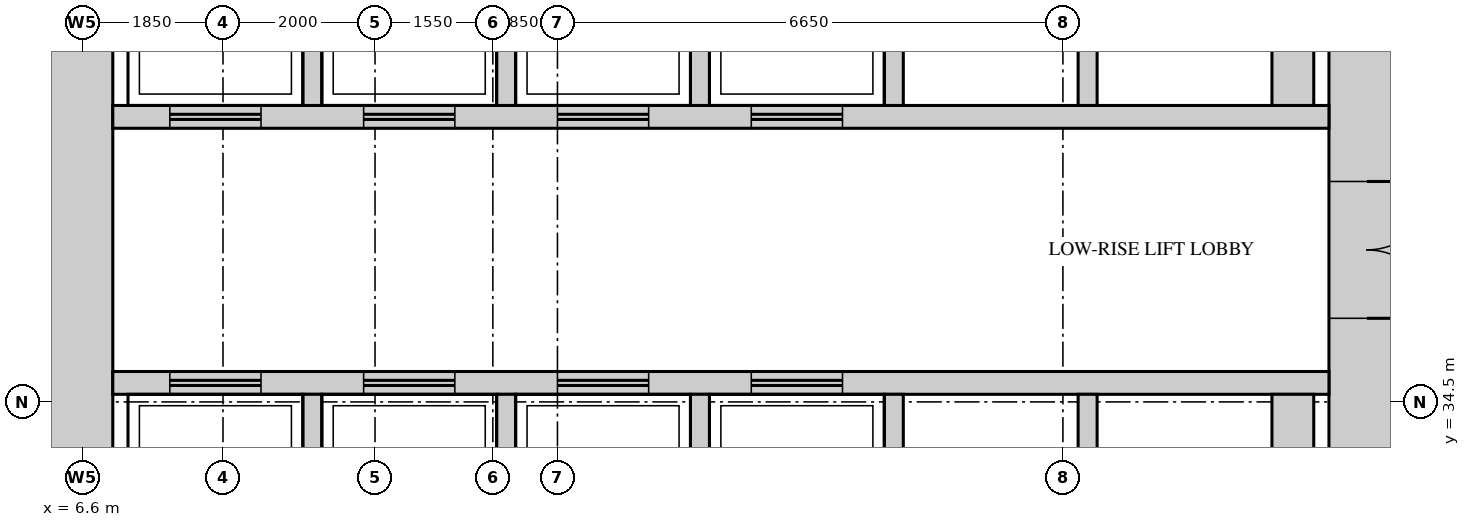
"""IFC4 building model, lengths in metres.
Left out: names, types, materials, properties, quantities, classifications, styles, units other than length and angle.
Written with IfcOpenShell. Run it as: python <this file> out.ifc"""

import sys

from ifc_helpers import new_model, si_unit, direction, frame, frame_2d, origin, place, context, subcontext, project, spatial, rectangle, extrude, source, transform, mapped, element, fill, save


model = new_model("IFC4")
c1 = context("Model", 3, precision=1e-05, world=origin(), true_north=direction((0.0, 1.0)))
c2 = subcontext(c1, "Body", "Model", "MODEL_VIEW")
j1 = project(units=[si_unit("LENGTHUNIT", "METRE"), si_unit("PLANEANGLEUNIT", "RADIAN")], contexts=[c1])
p1 = place(None, origin())
s1 = spatial("IfcSite", under=j1, at=p1, CompositionType="ELEMENT")
p2 = place(p1, origin())
s2 = spatial("IfcBuilding", under=s1, at=p2, CompositionType="ELEMENT")
p3 = place(p2, frame((0.0, 0.0, 127.9)))
s3 = spatial("IfcBuildingStorey", under=s2, at=p3, CompositionType="ELEMENT", Elevation=127.9)
m1 = source(origin(), c2, "Body", "SweptSolid", [
    extrude(rectangle(XDim=28.0, YDim=1.0, at=frame_2d((14.0, 0.0))), origin(), (0.0, 0.0, 1.0), 4.1),
])
p4 = place(p3, frame((23.5, 13.0, 0.0), z_axis=(0.0, 0.0, 1.0), x_axis=(0.0, 1.0, 0.0)))
e1 = element("IfcWall", 1, at=p4, inside=s3, PredefinedType="SHEAR", context=c2, shape_type="MappedRepresentation", body=[
    mapped(m1, transform((0.0, 0.0, 0.0))),
])
m2 = source(origin(), c2, "Body", "SweptSolid", [
    extrude(rectangle(XDim=1.8, YDim=2.1, at=frame_2d((0.9, 1.05))), frame((0.0, 0.51, 0.0), z_axis=(0.0, -1.0, 0.0), x_axis=(1.0, 0.0, 0.0)), (0.0, 0.0, 1.0), 1.02),
])
p5 = place(p4, frame((22.6, 0.0, 0.0)))
e2 = element("IfcOpeningElement", 2, at=p5, cuts=e1, PredefinedType="OPENING", context=c2, shape_type="MappedRepresentation", body=[
    mapped(m2, transform((0.0, 0.0, 0.0))),
])
m3 = source(origin(), c2, "Body", "SweptSolid", [
    extrude(rectangle(XDim=1.2, YDim=2.1, at=frame_2d((0.6, 1.05))), frame((0.0, 0.51, 0.0), z_axis=(0.0, -1.0, 0.0), x_axis=(1.0, 0.0, 0.0)), (0.0, 0.0, 1.0), 1.02),
])
p6 = place(p4, frame((15.35, 0.0, 0.0)))
e3 = element("IfcOpeningElement", 3, at=p6, cuts=e1, PredefinedType="OPENING", context=c2, shape_type="MappedRepresentation", body=[
    mapped(m3, transform((0.0, 0.0, 0.0))),
])
m4 = source(origin(), c2, "Body", "SweptSolid", [
    extrude(rectangle(XDim=0.9, YDim=2.1, at=frame_2d((0.45, 1.05))), frame((0.0, 0.51, 0.0), z_axis=(0.0, -1.0, 0.0), x_axis=(1.0, 0.0, 0.0)), (0.0, 0.0, 1.0), 1.02),
])
p7 = place(p4, frame((1.35, 0.0, 0.0)))
e4 = element("IfcOpeningElement", 4, at=p7, cuts=e1, PredefinedType="OPENING", context=c2, shape_type="MappedRepresentation", body=[
    mapped(m4, transform((0.0, 0.0, 0.0))),
])
p8 = place(p4, frame((4.55, 0.0, 0.0)))
e5 = element("IfcOpeningElement", 5, at=p8, cuts=e1, PredefinedType="OPENING", context=c2, shape_type="MappedRepresentation", body=[
    mapped(m4, transform((0.0, 0.0, 0.0))),
])
p9 = place(p4, frame((7.8, 0.0, 0.0)))
e6 = element("IfcOpeningElement", 6, at=p9, cuts=e1, PredefinedType="OPENING", context=c2, shape_type="MappedRepresentation", body=[
    mapped(m4, transform((0.0, 0.0, 0.0))),
])
p10 = place(p3, frame((6.5, 13.0, 0.0), z_axis=(0.0, 0.0, 1.0), x_axis=(0.0, 1.0, 0.0)))
e7 = element("IfcWall", 7, at=p10, inside=s3, PredefinedType="SHEAR", context=c2, shape_type="MappedRepresentation", body=[
    mapped(m1, transform((0.0, 0.0, 0.0))),
])
m5 = source(origin(), c2, "Body", "SweptSolid", [
    extrude(rectangle(XDim=16.0, YDim=0.3, at=frame_2d((8.0, 0.0))), origin(), (0.0, 0.0, 1.0), 4.1),
])
p11 = place(p3, frame((7.0, 38.25, 0.0), z_axis=(0.0, 0.0, 1.0), x_axis=(1.0, 0.0, 0.0)))
e8 = element("IfcWall", 8, at=p11, inside=s3, PredefinedType="STANDARD", context=c2, shape_type="MappedRepresentation", body=[
    mapped(m5, transform((0.0, 0.0, 0.0))),
])
m6 = source(origin(), c2, "Body", "SweptSolid", [
    extrude(rectangle(XDim=1.2, YDim=2.1, at=frame_2d((0.6, 1.05))), frame((0.0, 0.16, 0.0), z_axis=(0.0, -1.0, 0.0), x_axis=(1.0, 0.0, 0.0)), (0.0, 0.0, 1.0), 0.32),
])
p12 = place(p11, frame((0.75, 0.0, 0.0)))
e9 = element("IfcOpeningElement", 9, at=p12, cuts=e8, PredefinedType="OPENING", context=c2, shape_type="MappedRepresentation", body=[
    mapped(m6, transform((0.0, 0.0, 0.0))),
])
p13 = place(p11, frame((3.3, 0.0, 0.0)))
e10 = element("IfcOpeningElement", 10, at=p13, cuts=e8, PredefinedType="OPENING", context=c2, shape_type="MappedRepresentation", body=[
    mapped(m6, transform((0.0, 0.0, 0.0))),
])
p14 = place(p11, frame((5.85, 0.0, 0.0)))
e11 = element("IfcOpeningElement", 11, at=p14, cuts=e8, PredefinedType="OPENING", context=c2, shape_type="MappedRepresentation", body=[
    mapped(m6, transform((0.0, 0.0, 0.0))),
])
p15 = place(p11, frame((8.4, 0.0, 0.0)))
e12 = element("IfcOpeningElement", 12, at=p15, cuts=e8, PredefinedType="OPENING", context=c2, shape_type="MappedRepresentation", body=[
    mapped(m6, transform((0.0, 0.0, 0.0))),
])
p16 = place(p3, frame((7.0, 34.75, 0.0), z_axis=(0.0, 0.0, 1.0), x_axis=(1.0, 0.0, 0.0)))
e13 = element("IfcWall", 13, at=p16, inside=s3, PredefinedType="STANDARD", context=c2, shape_type="MappedRepresentation", body=[
    mapped(m5, transform((0.0, 0.0, 0.0))),
])
p17 = place(p16, frame((0.75, 0.0, 0.0)))
e14 = element("IfcOpeningElement", 14, at=p17, cuts=e13, PredefinedType="OPENING", context=c2, shape_type="MappedRepresentation", body=[
    mapped(m6, transform((0.0, 0.0, 0.0))),
])
p18 = place(p16, frame((3.3, 0.0, 0.0)))
e15 = element("IfcOpeningElement", 15, at=p18, cuts=e13, PredefinedType="OPENING", context=c2, shape_type="MappedRepresentation", body=[
    mapped(m6, transform((0.0, 0.0, 0.0))),
])
p19 = place(p16, frame((5.85, 0.0, 0.0)))
e16 = element("IfcOpeningElement", 16, at=p19, cuts=e13, PredefinedType="OPENING", context=c2, shape_type="MappedRepresentation", body=[
    mapped(m6, transform((0.0, 0.0, 0.0))),
])
p20 = place(p16, frame((8.4, 0.0, 0.0)))
e17 = element("IfcOpeningElement", 17, at=p20, cuts=e13, PredefinedType="OPENING", context=c2, shape_type="MappedRepresentation", body=[
    mapped(m6, transform((0.0, 0.0, 0.0))),
])
m7 = source(origin(), c2, "Body", "SweptSolid", [
    extrude(rectangle(XDim=2.6, YDim=0.25, at=frame_2d((1.3, 0.0))), origin(), (0.0, 0.0, 1.0), 4.1),
])
for number, where, z_axis, x_axis in (
    (18, (9.625, 38.4, 0.0), (0.0, 0.0, 1.0), (0.0, 1.0, 0.0)),
    (19, (12.175, 38.4, 0.0), (0.0, 0.0, 1.0), (0.0, 1.0, 0.0)),
    (20, (14.725, 38.4, 0.0), (0.0, 0.0, 1.0), (0.0, 1.0, 0.0)),
    (21, (17.275, 38.4, 0.0), (0.0, 0.0, 1.0), (0.0, 1.0, 0.0)),
    (22, (19.825, 38.4, 0.0), (0.0, 0.0, 1.0), (0.0, 1.0, 0.0)),
):
    element("IfcWall", number, at=place(p3, frame(where, z_axis=z_axis, x_axis=x_axis)), inside=s3, PredefinedType="STANDARD", context=c2, shape_type="MappedRepresentation", body=[
        mapped(m7, transform((0.0, 0.0, 0.0))),
    ])
m8 = source(origin(), c2, "Body", "SweptSolid", [
    extrude(rectangle(XDim=2.6, YDim=0.55, at=frame_2d((1.3, 0.0))), origin(), (0.0, 0.0, 1.0), 4.1),
])
p21 = place(p3, frame((22.525, 38.4, 0.0), z_axis=(0.0, 0.0, 1.0), x_axis=(0.0, 1.0, 0.0)))
e23 = element("IfcWall", 23, at=p21, inside=s3, PredefinedType="STANDARD", context=c2, shape_type="MappedRepresentation", body=[
    mapped(m8, transform((0.0, 0.0, 0.0))),
])
m9 = source(origin(), c2, "Body", "SweptSolid", [
    extrude(rectangle(XDim=2.4, YDim=0.25, at=frame_2d((1.2, 0.0))), origin(), (0.0, 0.0, 1.0), 4.1),
])
for number, where, z_axis, x_axis in (
    (24, (9.625, 32.2, 0.0), (0.0, 0.0, 1.0), (0.0, 1.0, 0.0)),
    (25, (12.175, 32.2, 0.0), (0.0, 0.0, 1.0), (0.0, 1.0, 0.0)),
    (26, (14.725, 32.2, 0.0), (0.0, 0.0, 1.0), (0.0, 1.0, 0.0)),
    (27, (17.275, 32.2, 0.0), (0.0, 0.0, 1.0), (0.0, 1.0, 0.0)),
    (28, (19.825, 32.2, 0.0), (0.0, 0.0, 1.0), (0.0, 1.0, 0.0)),
):
    element("IfcWall", number, at=place(p3, frame(where, z_axis=z_axis, x_axis=x_axis)), inside=s3, PredefinedType="STANDARD", context=c2, shape_type="MappedRepresentation", body=[
        mapped(m9, transform((0.0, 0.0, 0.0))),
    ])
m10 = source(origin(), c2, "Body", "SweptSolid", [
    extrude(rectangle(XDim=2.4, YDim=0.55, at=frame_2d((1.2, 0.0))), origin(), (0.0, 0.0, 1.0), 4.1),
])
p22 = place(p3, frame((22.525, 32.2, 0.0), z_axis=(0.0, 0.0, 1.0), x_axis=(0.0, 1.0, 0.0)))
e29 = element("IfcWall", 29, at=p22, inside=s3, PredefinedType="STANDARD", context=c2, shape_type="MappedRepresentation", body=[
    mapped(m10, transform((0.0, 0.0, 0.0))),
])
m11 = source(origin(), c2, "Body", "SweptSolid", [
    extrude(rectangle(XDim=1.8, YDim=2.1, at=frame_2d((0.9, 1.05))), frame((0.0, 0.45, 0.0), z_axis=(0.0, -1.0, 0.0), x_axis=(1.0, 0.0, 0.0)), (0.0, 0.0, 1.0), 0.9),
])
p23 = place(p5, origin())
e30 = element("IfcDoor", 30, at=p23, inside=s3, OperationType="DOUBLE_DOOR_SINGLE_SWING", PredefinedType="DOOR", context=c2, shape_type="MappedRepresentation", body=[
    mapped(m11, transform((0.0, 0.0, 0.0))),
])
fill(e2, e30)
m12 = source(origin(), c2, "Body", "SweptSolid", [
    extrude(rectangle(XDim=1.2, YDim=2.1, at=frame_2d((0.6, 1.05))), frame((0.0, 0.025, 0.0), z_axis=(0.0, -1.0, 0.0), x_axis=(1.0, 0.0, 0.0)), (0.0, 0.0, 1.0), 0.05),
])
p24 = place(p17, origin())
e31 = element("IfcDoor", 31, at=p24, inside=s3, OperationType="DOUBLE_DOOR_SLIDING", PredefinedType="DOOR", context=c2, shape_type="MappedRepresentation", body=[
    mapped(m12, transform((0.0, 0.0, 0.0))),
])
fill(e14, e31)
p25 = place(p18, origin())
e32 = element("IfcDoor", 32, at=p25, inside=s3, OperationType="DOUBLE_DOOR_SLIDING", PredefinedType="DOOR", context=c2, shape_type="MappedRepresentation", body=[
    mapped(m12, transform((0.0, 0.0, 0.0))),
])
fill(e15, e32)
p26 = place(p19, origin())
e33 = element("IfcDoor", 33, at=p26, inside=s3, OperationType="DOUBLE_DOOR_SLIDING", PredefinedType="DOOR", context=c2, shape_type="MappedRepresentation", body=[
    mapped(m12, transform((0.0, 0.0, 0.0))),
])
fill(e16, e33)
p27 = place(p20, origin())
e34 = element("IfcDoor", 34, at=p27, inside=s3, OperationType="DOUBLE_DOOR_SLIDING", PredefinedType="DOOR", context=c2, shape_type="MappedRepresentation", body=[
    mapped(m12, transform((0.0, 0.0, 0.0))),
])
fill(e17, e34)
p28 = place(p12, origin())
e35 = element("IfcDoor", 35, at=p28, inside=s3, OperationType="DOUBLE_DOOR_SLIDING", PredefinedType="DOOR", context=c2, shape_type="MappedRepresentation", body=[
    mapped(m12, transform((0.0, 0.0, 0.0))),
])
fill(e9, e35)
p29 = place(p13, origin())
e36 = element("IfcDoor", 36, at=p29, inside=s3, OperationType="DOUBLE_DOOR_SLIDING", PredefinedType="DOOR", context=c2, shape_type="MappedRepresentation", body=[
    mapped(m12, transform((0.0, 0.0, 0.0))),
])
fill(e10, e36)
p30 = place(p14, origin())
e37 = element("IfcDoor", 37, at=p30, inside=s3, OperationType="DOUBLE_DOOR_SLIDING", PredefinedType="DOOR", context=c2, shape_type="MappedRepresentation", body=[
    mapped(m12, transform((0.0, 0.0, 0.0))),
])
fill(e11, e37)
p31 = place(p15, origin())
e38 = element("IfcDoor", 38, at=p31, inside=s3, OperationType="DOUBLE_DOOR_SLIDING", PredefinedType="DOOR", context=c2, shape_type="MappedRepresentation", body=[
    mapped(m12, transform((0.0, 0.0, 0.0))),
])
fill(e12, e38)
save(model, sys.argv[1])
